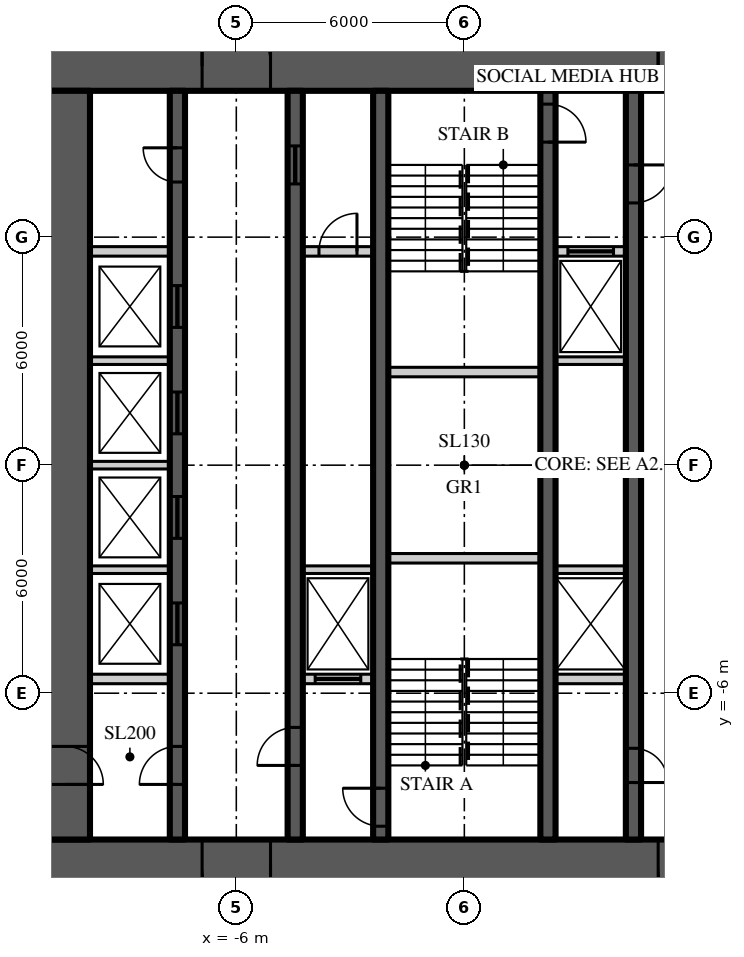
"""IFC4 building model, lengths in metres.
Left out: names, types, materials, properties, quantities, classifications, styles, units other than length and angle.
Written with IfcOpenShell. Run it as: python <this file> out.ifc"""

import sys

from ifc_helpers import new_model, si_unit, direction, frame, frame_2d, origin, place, context, subcontext, project, spatial, rectangle, extrude, element, fill, save


model = new_model("IFC4")
c1 = context("Model", 3, precision=1e-05, world=origin(), true_north=direction((0.0, 1.0)))
c2 = subcontext(c1, "Body", "Model", "MODEL_VIEW")
j1 = project(units=[si_unit("LENGTHUNIT", "METRE"), si_unit("PLANEANGLEUNIT", "RADIAN")], contexts=[c1])
p1 = place(None, origin())
s1 = spatial("IfcSite", under=j1, at=p1, CompositionType="ELEMENT")
p2 = place(p1, origin())
s2 = spatial("IfcBuilding", under=s1, at=p2, CompositionType="ELEMENT")
p3 = place(p2, frame((0.0, 0.0, 74.7)))
s3 = spatial("IfcBuildingStorey", under=s2, at=p3, CompositionType="ELEMENT", Elevation=74.7)
p4 = place(p3, frame((-11.15, 10.5, 0.0), z_axis=(0.0, 0.0, 1.0), x_axis=(1.0, 0.0, 0.0)))
e1 = element("IfcWall", 1, at=p4, inside=s3, PredefinedType="SHEAR", context=c2, shape_type="SweptSolid", body=[
    extrude(rectangle(XDim=22.3, YDim=1.3, at=frame_2d((11.15, 0.0))), origin(), (0.0, 0.0, 1.0), 3.9),
])
p5 = place(p4, frame((4.25, 0.0, 0.0)))
e2 = element("IfcOpeningElement", 2, at=p5, cuts=e1, PredefinedType="OPENING", context=c2, shape_type="SweptSolid", body=[
    extrude(rectangle(XDim=1.8, YDim=2.2, at=frame_2d((0.9, 1.1))), frame((0.0, 0.66, 0.0), z_axis=(0.0, -1.0, 0.0), x_axis=(1.0, 0.0, 0.0)), (0.0, 0.0, 1.0), 1.32),
])
p6 = place(p4, frame((16.25, 0.0, 0.0)))
e3 = element("IfcOpeningElement", 3, at=p6, cuts=e1, PredefinedType="OPENING", context=c2, shape_type="SweptSolid", body=[
    extrude(rectangle(XDim=1.8, YDim=2.2, at=frame_2d((0.9, 1.1))), frame((0.0, 0.66, 0.0), z_axis=(0.0, -1.0, 0.0), x_axis=(1.0, 0.0, 0.0)), (0.0, 0.0, 1.0), 1.32),
])
p7 = place(p3, frame((11.15, -10.5, 0.0), z_axis=(0.0, 0.0, 1.0), x_axis=(-1.0, 0.0, 0.0)))
e4 = element("IfcWall", 4, at=p7, inside=s3, PredefinedType="SHEAR", context=c2, shape_type="SweptSolid", body=[
    extrude(rectangle(XDim=22.3, YDim=1.3, at=frame_2d((11.15, 0.0))), origin(), (0.0, 0.0, 1.0), 3.9),
])
p8 = place(p7, frame((16.25, 0.0, 0.0)))
e5 = element("IfcOpeningElement", 5, at=p8, cuts=e4, PredefinedType="OPENING", context=c2, shape_type="SweptSolid", body=[
    extrude(rectangle(XDim=1.8, YDim=2.2, at=frame_2d((0.9, 1.1))), frame((0.0, 0.66, 0.0), z_axis=(0.0, -1.0, 0.0), x_axis=(1.0, 0.0, 0.0)), (0.0, 0.0, 1.0), 1.32),
])
p9 = place(p7, frame((4.25, 0.0, 0.0)))
e6 = element("IfcOpeningElement", 6, at=p9, cuts=e4, PredefinedType="OPENING", context=c2, shape_type="SweptSolid", body=[
    extrude(rectangle(XDim=1.8, YDim=2.2, at=frame_2d((0.9, 1.1))), frame((0.0, 0.66, 0.0), z_axis=(0.0, -1.0, 0.0), x_axis=(1.0, 0.0, 0.0)), (0.0, 0.0, 1.0), 1.32),
])
p10 = place(p3, frame((-10.5, 9.85, 0.0), z_axis=(0.0, 0.0, 1.0), x_axis=(0.0, -1.0, 0.0)))
e7 = element("IfcWall", 7, at=p10, inside=s3, PredefinedType="SHEAR", context=c2, shape_type="SweptSolid", body=[
    extrude(rectangle(XDim=19.7, YDim=1.3, at=frame_2d((9.85, 0.0))), origin(), (0.0, 0.0, 1.0), 3.9),
])
p11 = place(p10, frame((17.25, 0.0, 0.0)))
e8 = element("IfcOpeningElement", 8, at=p11, cuts=e7, PredefinedType="OPENING", context=c2, shape_type="SweptSolid", body=[
    extrude(rectangle(XDim=1.0, YDim=2.2, at=frame_2d((0.5, 1.1))), frame((0.0, 0.66, 0.0), z_axis=(0.0, -1.0, 0.0), x_axis=(1.0, 0.0, 0.0)), (0.0, 0.0, 1.0), 1.32),
])
p12 = place(p3, frame((-7.55, -9.85, 0.0), z_axis=(0.0, 0.0, 1.0), x_axis=(0.0, 1.0, 0.0)))
e9 = element("IfcWall", 9, at=p12, inside=s3, PredefinedType="SHEAR", context=c2, shape_type="SweptSolid", body=[
    extrude(rectangle(XDim=19.7, YDim=0.4, at=frame_2d((9.85, 0.0))), origin(), (0.0, 0.0, 1.0), 3.9),
])
p13 = place(p12, frame((1.45, 0.0, 0.0)))
e10 = element("IfcOpeningElement", 10, at=p13, cuts=e9, PredefinedType="OPENING", context=c2, shape_type="SweptSolid", body=[
    extrude(rectangle(XDim=1.0, YDim=2.2, at=frame_2d((0.5, 1.1))), frame((0.0, 0.21, 0.0), z_axis=(0.0, -1.0, 0.0), x_axis=(1.0, 0.0, 0.0)), (0.0, 0.0, 1.0), 0.42),
])
p14 = place(p12, frame((17.3, 0.0, 0.0)))
e11 = element("IfcOpeningElement", 11, at=p14, cuts=e9, PredefinedType="OPENING", context=c2, shape_type="SweptSolid", body=[
    extrude(rectangle(XDim=0.9, YDim=2.1, at=frame_2d((0.45, 1.05))), frame((0.0, 0.21, 0.0), z_axis=(0.0, -1.0, 0.0), x_axis=(1.0, 0.0, 0.0)), (0.0, 0.0, 1.0), 0.42),
])
p15 = place(p12, frame((5.125, 0.0, 0.0)))
e12 = element("IfcOpeningElement", 12, at=p15, cuts=e9, PredefinedType="OPENING", context=c2, shape_type="SweptSolid", body=[
    extrude(rectangle(XDim=1.1, YDim=2.2, at=frame_2d((0.55, 1.1))), frame((0.0, 0.21, 0.0), z_axis=(0.0, -1.0, 0.0), x_axis=(1.0, 0.0, 0.0)), (0.0, 0.0, 1.0), 0.42),
])
p16 = place(p12, frame((7.925, 0.0, 0.0)))
e13 = element("IfcOpeningElement", 13, at=p16, cuts=e9, PredefinedType="OPENING", context=c2, shape_type="SweptSolid", body=[
    extrude(rectangle(XDim=1.1, YDim=2.2, at=frame_2d((0.55, 1.1))), frame((0.0, 0.21, 0.0), z_axis=(0.0, -1.0, 0.0), x_axis=(1.0, 0.0, 0.0)), (0.0, 0.0, 1.0), 0.42),
])
p17 = place(p12, frame((10.675, 0.0, 0.0)))
e14 = element("IfcOpeningElement", 14, at=p17, cuts=e9, PredefinedType="OPENING", context=c2, shape_type="SweptSolid", body=[
    extrude(rectangle(XDim=1.1, YDim=2.2, at=frame_2d((0.55, 1.1))), frame((0.0, 0.21, 0.0), z_axis=(0.0, -1.0, 0.0), x_axis=(1.0, 0.0, 0.0)), (0.0, 0.0, 1.0), 0.42),
])
p18 = place(p12, frame((13.475, 0.0, 0.0)))
e15 = element("IfcOpeningElement", 15, at=p18, cuts=e9, PredefinedType="OPENING", context=c2, shape_type="SweptSolid", body=[
    extrude(rectangle(XDim=1.1, YDim=2.2, at=frame_2d((0.55, 1.1))), frame((0.0, 0.21, 0.0), z_axis=(0.0, -1.0, 0.0), x_axis=(1.0, 0.0, 0.0)), (0.0, 0.0, 1.0), 0.42),
])
p19 = place(p3, frame((-4.45, -9.85, 0.0), z_axis=(0.0, 0.0, 1.0), x_axis=(0.0, 1.0, 0.0)))
e16 = element("IfcWall", 16, at=p19, inside=s3, PredefinedType="SHEAR", context=c2, shape_type="SweptSolid", body=[
    extrude(rectangle(XDim=19.7, YDim=0.4, at=frame_2d((9.85, 0.0))), origin(), (0.0, 0.0, 1.0), 3.9),
])
p20 = place(p19, frame((1.95, 0.0, 0.0)))
e17 = element("IfcOpeningElement", 17, at=p20, cuts=e16, PredefinedType="OPENING", context=c2, shape_type="SweptSolid", body=[
    extrude(rectangle(XDim=1.0, YDim=2.2, at=frame_2d((0.5, 1.1))), frame((0.0, 0.21, 0.0), z_axis=(0.0, -1.0, 0.0), x_axis=(1.0, 0.0, 0.0)), (0.0, 0.0, 1.0), 0.42),
])
p21 = place(p19, frame((17.25, 0.0, 0.0)))
e18 = element("IfcOpeningElement", 18, at=p21, cuts=e16, PredefinedType="OPENING", context=c2, shape_type="SweptSolid", body=[
    extrude(rectangle(XDim=1.0, YDim=2.1, at=frame_2d((0.5, 1.05))), frame((0.0, 0.21, 0.0), z_axis=(0.0, -1.0, 0.0), x_axis=(1.0, 0.0, 0.0)), (0.0, 0.0, 1.0), 0.42),
])
p22 = place(p3, frame((4.45, 9.85, 0.0), z_axis=(0.0, 0.0, 1.0), x_axis=(0.0, -1.0, 0.0)))
e19 = element("IfcWall", 19, at=p22, inside=s3, PredefinedType="SHEAR", context=c2, shape_type="SweptSolid", body=[
    extrude(rectangle(XDim=19.7, YDim=0.4, at=frame_2d((9.85, 0.0))), origin(), (0.0, 0.0, 1.0), 3.9),
])
p23 = place(p22, frame((1.95, 0.0, 0.0)))
e20 = element("IfcOpeningElement", 20, at=p23, cuts=e19, PredefinedType="OPENING", context=c2, shape_type="SweptSolid", body=[
    extrude(rectangle(XDim=1.0, YDim=2.2, at=frame_2d((0.5, 1.1))), frame((0.0, 0.21, 0.0), z_axis=(0.0, -1.0, 0.0), x_axis=(1.0, 0.0, 0.0)), (0.0, 0.0, 1.0), 0.42),
])
p24 = place(p22, frame((17.3, 0.0, 0.0)))
e21 = element("IfcOpeningElement", 21, at=p24, cuts=e19, PredefinedType="OPENING", context=c2, shape_type="SweptSolid", body=[
    extrude(rectangle(XDim=0.9, YDim=2.1, at=frame_2d((0.45, 1.05))), frame((0.0, 0.21, 0.0), z_axis=(0.0, -1.0, 0.0), x_axis=(1.0, 0.0, 0.0)), (0.0, 0.0, 1.0), 0.42),
])
p25 = place(p3, frame((-2.2, -9.85, 0.0), z_axis=(0.0, 0.0, 1.0), x_axis=(0.0, 1.0, 0.0)))
e22 = element("IfcWall", 22, at=p25, inside=s3, PredefinedType="SHEAR", context=c2, shape_type="SweptSolid", body=[
    extrude(rectangle(XDim=19.7, YDim=0.4, at=frame_2d((9.85, 0.0))), origin(), (0.0, 0.0, 1.0), 3.9),
])
p26 = place(p25, frame((0.35, 0.0, 0.0)))
e23 = element("IfcOpeningElement", 23, at=p26, cuts=e22, PredefinedType="OPENING", context=c2, shape_type="SweptSolid", body=[
    extrude(rectangle(XDim=1.0, YDim=2.2, at=frame_2d((0.5, 1.1))), frame((0.0, 0.21, 0.0), z_axis=(0.0, -1.0, 0.0), x_axis=(1.0, 0.0, 0.0)), (0.0, 0.0, 1.0), 0.42),
])
p27 = place(p3, frame((2.2, 9.85, 0.0), z_axis=(0.0, 0.0, 1.0), x_axis=(0.0, -1.0, 0.0)))
e24 = element("IfcWall", 24, at=p27, inside=s3, PredefinedType="SHEAR", context=c2, shape_type="SweptSolid", body=[
    extrude(rectangle(XDim=19.7, YDim=0.4, at=frame_2d((9.85, 0.0))), origin(), (0.0, 0.0, 1.0), 3.9),
])
p28 = place(p27, frame((0.35, 0.0, 0.0)))
e25 = element("IfcOpeningElement", 25, at=p28, cuts=e24, PredefinedType="OPENING", context=c2, shape_type="SweptSolid", body=[
    extrude(rectangle(XDim=1.0, YDim=2.2, at=frame_2d((0.5, 1.1))), frame((0.0, 0.21, 0.0), z_axis=(0.0, -1.0, 0.0), x_axis=(1.0, 0.0, 0.0)), (0.0, 0.0, 1.0), 0.42),
])
p29 = place(p3, frame((-9.85, 5.625, 0.0), z_axis=(0.0, 0.0, 1.0), x_axis=(1.0, 0.0, 0.0)))
e26 = element("IfcWall", 26, at=p29, inside=s3, PredefinedType="SOLIDWALL", context=c2, shape_type="SweptSolid", body=[
    extrude(rectangle(XDim=2.1, YDim=0.25, at=frame_2d((1.05, 0.0))), origin(), (0.0, 0.0, 1.0), 3.7),
])
p30 = place(p3, frame((-4.25, 5.625, 0.0), z_axis=(0.0, 0.0, 1.0), x_axis=(1.0, 0.0, 0.0)))
e27 = element("IfcWall", 27, at=p30, inside=s3, PredefinedType="SOLIDWALL", context=c2, shape_type="SweptSolid", body=[
    extrude(rectangle(XDim=1.85, YDim=0.25, at=frame_2d((0.925, 0.0))), origin(), (0.0, 0.0, 1.0), 3.7),
])
p31 = place(p30, frame((0.425, 0.0, 0.0)))
e28 = element("IfcOpeningElement", 28, at=p31, cuts=e27, PredefinedType="OPENING", context=c2, shape_type="SweptSolid", body=[
    extrude(rectangle(XDim=1.0, YDim=2.2, at=frame_2d((0.5, 1.1))), frame((0.0, 0.135, 0.0), z_axis=(0.0, -1.0, 0.0), x_axis=(1.0, 0.0, 0.0)), (0.0, 0.0, 1.0), 0.27),
])
p32 = place(p3, frame((2.4, 5.625, 0.0), z_axis=(0.0, 0.0, 1.0), x_axis=(1.0, 0.0, 0.0)))
e29 = element("IfcWall", 29, at=p32, inside=s3, PredefinedType="SOLIDWALL", context=c2, shape_type="SweptSolid", body=[
    extrude(rectangle(XDim=1.85, YDim=0.25, at=frame_2d((0.925, 0.0))), origin(), (0.0, 0.0, 1.0), 3.7),
])
p33 = place(p32, frame((0.325, 0.0, 0.0)))
e30 = element("IfcOpeningElement", 30, at=p33, cuts=e29, PredefinedType="OPENING", context=c2, shape_type="SweptSolid", body=[
    extrude(rectangle(XDim=1.2, YDim=2.2, at=frame_2d((0.6, 1.1))), frame((0.0, 0.135, 0.0), z_axis=(0.0, -1.0, 0.0), x_axis=(1.0, 0.0, 0.0)), (0.0, 0.0, 1.0), 0.27),
])
p34 = place(p3, frame((-9.85, -5.625, 0.0), z_axis=(0.0, 0.0, 1.0), x_axis=(1.0, 0.0, 0.0)))
e31 = element("IfcWall", 31, at=p34, inside=s3, PredefinedType="SOLIDWALL", context=c2, shape_type="SweptSolid", body=[
    extrude(rectangle(XDim=2.1, YDim=0.25, at=frame_2d((1.05, 0.0))), origin(), (0.0, 0.0, 1.0), 3.7),
])
p35 = place(p3, frame((-4.25, -5.625, 0.0), z_axis=(0.0, 0.0, 1.0), x_axis=(1.0, 0.0, 0.0)))
e32 = element("IfcWall", 32, at=p35, inside=s3, PredefinedType="SOLIDWALL", context=c2, shape_type="SweptSolid", body=[
    extrude(rectangle(XDim=1.85, YDim=0.25, at=frame_2d((0.925, 0.0))), origin(), (0.0, 0.0, 1.0), 3.7),
])
p36 = place(p35, frame((0.325, 0.0, 0.0)))
e33 = element("IfcOpeningElement", 33, at=p36, cuts=e32, PredefinedType="OPENING", context=c2, shape_type="SweptSolid", body=[
    extrude(rectangle(XDim=1.2, YDim=2.2, at=frame_2d((0.6, 1.1))), frame((0.0, 0.135, 0.0), z_axis=(0.0, -1.0, 0.0), x_axis=(1.0, 0.0, 0.0)), (0.0, 0.0, 1.0), 0.27),
])
p37 = place(p3, frame((2.4, -5.625, 0.0), z_axis=(0.0, 0.0, 1.0), x_axis=(1.0, 0.0, 0.0)))
e34 = element("IfcWall", 34, at=p37, inside=s3, PredefinedType="SOLIDWALL", context=c2, shape_type="SweptSolid", body=[
    extrude(rectangle(XDim=1.85, YDim=0.25, at=frame_2d((0.925, 0.0))), origin(), (0.0, 0.0, 1.0), 3.7),
])
for number, where, z_axis, x_axis in (
    (35, (-2.0, -2.45, 0.0), (0.0, 0.0, 1.0), (1.0, 0.0, 0.0)),
    (36, (-2.0, 2.45, 0.0), (0.0, 0.0, 1.0), (1.0, 0.0, 0.0)),
):
    element("IfcWall", number, at=place(p3, frame(where, z_axis=z_axis, x_axis=x_axis)), inside=s3, PredefinedType="SOLIDWALL", context=c2, shape_type="SweptSolid", body=[
        extrude(rectangle(XDim=4.0, YDim=0.25, at=frame_2d((2.0, 0.0))), origin(), (0.0, 0.0, 1.0), 3.7),
    ])
p38 = place(p3, frame((-9.85, -2.75, 0.0), z_axis=(0.0, 0.0, 1.0), x_axis=(1.0, 0.0, 0.0)))
e37 = element("IfcWall", 37, at=p38, inside=s3, PredefinedType="SOLIDWALL", context=c2, shape_type="SweptSolid", body=[
    extrude(rectangle(XDim=2.1, YDim=0.2, at=frame_2d((1.05, 0.0))), origin(), (0.0, 0.0, 1.0), 3.7),
])
for number, where, z_axis, x_axis in (
    (38, (-4.25, -2.75, 0.0), (0.0, 0.0, 1.0), (1.0, 0.0, 0.0)),
    (39, (2.4, -2.75, 0.0), (0.0, 0.0, 1.0), (1.0, 0.0, 0.0)),
):
    element("IfcWall", number, at=place(p3, frame(where, z_axis=z_axis, x_axis=x_axis)), inside=s3, PredefinedType="SOLIDWALL", context=c2, shape_type="SweptSolid", body=[
        extrude(rectangle(XDim=1.85, YDim=0.2, at=frame_2d((0.925, 0.0))), origin(), (0.0, 0.0, 1.0), 3.7),
    ])
for number, where, z_axis, x_axis in (
    (40, (-9.85, 0.0, 0.0), (0.0, 0.0, 1.0), (1.0, 0.0, 0.0)),
    (41, (-9.85, 2.75, 0.0), (0.0, 0.0, 1.0), (1.0, 0.0, 0.0)),
):
    element("IfcWall", number, at=place(p3, frame(where, z_axis=z_axis, x_axis=x_axis)), inside=s3, PredefinedType="SOLIDWALL", context=c2, shape_type="SweptSolid", body=[
        extrude(rectangle(XDim=2.1, YDim=0.2, at=frame_2d((1.05, 0.0))), origin(), (0.0, 0.0, 1.0), 3.7),
    ])
p39 = place(p3, frame((2.4, 2.75, 0.0), z_axis=(0.0, 0.0, 1.0), x_axis=(1.0, 0.0, 0.0)))
e42 = element("IfcWall", 42, at=p39, inside=s3, PredefinedType="SOLIDWALL", context=c2, shape_type="SweptSolid", body=[
    extrude(rectangle(XDim=1.85, YDim=0.2, at=frame_2d((0.925, 0.0))), origin(), (0.0, 0.0, 1.0), 3.7),
])
p40 = place(p5, origin())
e43 = element("IfcDoor", 43, at=p40, inside=s3, OperationType="DOUBLE_DOOR_DOUBLE_SWING", PredefinedType="DOOR", context=c2, shape_type="SweptSolid", body=[
    extrude(rectangle(XDim=1.8, YDim=2.2, at=frame_2d((0.9, 1.1))), frame((0.0, 0.025, 0.0), z_axis=(0.0, -1.0, 0.0), x_axis=(1.0, 0.0, 0.0)), (0.0, 0.0, 1.0), 0.05),
])
fill(e2, e43)
p41 = place(p8, origin())
e44 = element("IfcDoor", 44, at=p41, inside=s3, OperationType="DOUBLE_DOOR_DOUBLE_SWING", PredefinedType="DOOR", context=c2, shape_type="SweptSolid", body=[
    extrude(rectangle(XDim=1.8, YDim=2.2, at=frame_2d((0.9, 1.1))), frame((0.0, 0.025, 0.0), z_axis=(0.0, -1.0, 0.0), x_axis=(1.0, 0.0, 0.0)), (0.0, 0.0, 1.0), 0.05),
])
fill(e5, e44)
p42 = place(p6, origin())
e45 = element("IfcDoor", 45, at=p42, inside=s3, OperationType="DOUBLE_DOOR_DOUBLE_SWING", PredefinedType="DOOR", context=c2, shape_type="SweptSolid", body=[
    extrude(rectangle(XDim=1.8, YDim=2.2, at=frame_2d((0.9, 1.1))), frame((0.0, 0.025, 0.0), z_axis=(0.0, -1.0, 0.0), x_axis=(1.0, 0.0, 0.0)), (0.0, 0.0, 1.0), 0.05),
])
fill(e3, e45)
p43 = place(p9, origin())
e46 = element("IfcDoor", 46, at=p43, inside=s3, OperationType="DOUBLE_DOOR_DOUBLE_SWING", PredefinedType="DOOR", context=c2, shape_type="SweptSolid", body=[
    extrude(rectangle(XDim=1.8, YDim=2.2, at=frame_2d((0.9, 1.1))), frame((0.0, 0.025, 0.0), z_axis=(0.0, -1.0, 0.0), x_axis=(1.0, 0.0, 0.0)), (0.0, 0.0, 1.0), 0.05),
])
fill(e6, e46)
p44 = place(p13, origin())
e47 = element("IfcDoor", 47, at=p44, inside=s3, OperationType="SINGLE_SWING_LEFT", PredefinedType="DOOR", context=c2, shape_type="SweptSolid", body=[
    extrude(rectangle(XDim=1.0, YDim=2.2, at=frame_2d((0.5, 1.1))), frame((0.0, 0.025, 0.0), z_axis=(0.0, -1.0, 0.0), x_axis=(1.0, 0.0, 0.0)), (0.0, 0.0, 1.0), 0.05),
])
fill(e10, e47)
p45 = place(p11, origin())
e48 = element("IfcDoor", 48, at=p45, inside=s3, OperationType="SINGLE_SWING_RIGHT", PredefinedType="DOOR", context=c2, shape_type="SweptSolid", body=[
    extrude(rectangle(XDim=1.0, YDim=2.2, at=frame_2d((0.5, 1.1))), frame((0.0, 0.025, 0.0), z_axis=(0.0, -1.0, 0.0), x_axis=(1.0, 0.0, 0.0)), (0.0, 0.0, 1.0), 0.05),
])
fill(e8, e48)
p46 = place(p20, origin())
e49 = element("IfcDoor", 49, at=p46, inside=s3, OperationType="SINGLE_SWING_LEFT", PredefinedType="DOOR", context=c2, shape_type="SweptSolid", body=[
    extrude(rectangle(XDim=1.0, YDim=2.2, at=frame_2d((0.5, 1.1))), frame((0.0, 0.025, 0.0), z_axis=(0.0, -1.0, 0.0), x_axis=(1.0, 0.0, 0.0)), (0.0, 0.0, 1.0), 0.05),
])
fill(e17, e49)
p47 = place(p26, origin())
e50 = element("IfcDoor", 50, at=p47, inside=s3, OperationType="SINGLE_SWING_RIGHT", PredefinedType="DOOR", context=c2, shape_type="SweptSolid", body=[
    extrude(rectangle(XDim=1.0, YDim=2.2, at=frame_2d((0.5, 1.1))), frame((0.0, 0.025, 0.0), z_axis=(0.0, -1.0, 0.0), x_axis=(1.0, 0.0, 0.0)), (0.0, 0.0, 1.0), 0.05),
])
fill(e23, e50)
p48 = place(p23, origin())
e51 = element("IfcDoor", 51, at=p48, inside=s3, OperationType="SINGLE_SWING_LEFT", PredefinedType="DOOR", context=c2, shape_type="SweptSolid", body=[
    extrude(rectangle(XDim=1.0, YDim=2.2, at=frame_2d((0.5, 1.1))), frame((0.0, 0.025, 0.0), z_axis=(0.0, -1.0, 0.0), x_axis=(1.0, 0.0, 0.0)), (0.0, 0.0, 1.0), 0.05),
])
fill(e20, e51)
p49 = place(p28, origin())
e52 = element("IfcDoor", 52, at=p49, inside=s3, OperationType="SINGLE_SWING_RIGHT", PredefinedType="DOOR", context=c2, shape_type="SweptSolid", body=[
    extrude(rectangle(XDim=1.0, YDim=2.2, at=frame_2d((0.5, 1.1))), frame((0.0, 0.025, 0.0), z_axis=(0.0, -1.0, 0.0), x_axis=(1.0, 0.0, 0.0)), (0.0, 0.0, 1.0), 0.05),
])
fill(e25, e52)
p50 = place(p14, origin())
e53 = element("IfcDoor", 53, at=p50, inside=s3, OperationType="SINGLE_SWING_RIGHT", PredefinedType="DOOR", context=c2, shape_type="SweptSolid", body=[
    extrude(rectangle(XDim=0.9, YDim=2.1, at=frame_2d((0.45, 1.05))), frame((0.0, 0.025, 0.0), z_axis=(0.0, -1.0, 0.0), x_axis=(1.0, 0.0, 0.0)), (0.0, 0.0, 1.0), 0.05),
])
fill(e11, e53)
p51 = place(p21, origin())
e54 = element("IfcDoor", 54, at=p51, inside=s3, OperationType="SLIDING_TO_LEFT", PredefinedType="DOOR", context=c2, shape_type="SweptSolid", body=[
    extrude(rectangle(XDim=1.0, YDim=2.1, at=frame_2d((0.5, 1.05))), frame((0.0, 0.025, 0.0), z_axis=(0.0, -1.0, 0.0), x_axis=(1.0, 0.0, 0.0)), (0.0, 0.0, 1.0), 0.05),
])
fill(e18, e54)
p52 = place(p24, origin())
e55 = element("IfcDoor", 55, at=p52, inside=s3, OperationType="SINGLE_SWING_RIGHT", PredefinedType="DOOR", context=c2, shape_type="SweptSolid", body=[
    extrude(rectangle(XDim=0.9, YDim=2.1, at=frame_2d((0.45, 1.05))), frame((0.0, 0.025, 0.0), z_axis=(0.0, -1.0, 0.0), x_axis=(1.0, 0.0, 0.0)), (0.0, 0.0, 1.0), 0.05),
])
fill(e21, e55)
p53 = place(p15, origin())
e56 = element("IfcDoor", 56, at=p53, inside=s3, OperationType="SLIDING_TO_LEFT", PredefinedType="DOOR", context=c2, shape_type="SweptSolid", body=[
    extrude(rectangle(XDim=1.1, YDim=2.2, at=frame_2d((0.55, 1.1))), frame((0.0, 0.025, 0.0), z_axis=(0.0, -1.0, 0.0), x_axis=(1.0, 0.0, 0.0)), (0.0, 0.0, 1.0), 0.05),
])
fill(e12, e56)
p54 = place(p16, origin())
e57 = element("IfcDoor", 57, at=p54, inside=s3, OperationType="SLIDING_TO_LEFT", PredefinedType="DOOR", context=c2, shape_type="SweptSolid", body=[
    extrude(rectangle(XDim=1.1, YDim=2.2, at=frame_2d((0.55, 1.1))), frame((0.0, 0.025, 0.0), z_axis=(0.0, -1.0, 0.0), x_axis=(1.0, 0.0, 0.0)), (0.0, 0.0, 1.0), 0.05),
])
fill(e13, e57)
p55 = place(p17, origin())
e58 = element("IfcDoor", 58, at=p55, inside=s3, OperationType="SLIDING_TO_LEFT", PredefinedType="DOOR", context=c2, shape_type="SweptSolid", body=[
    extrude(rectangle(XDim=1.1, YDim=2.2, at=frame_2d((0.55, 1.1))), frame((0.0, 0.025, 0.0), z_axis=(0.0, -1.0, 0.0), x_axis=(1.0, 0.0, 0.0)), (0.0, 0.0, 1.0), 0.05),
])
fill(e14, e58)
p56 = place(p18, origin())
e59 = element("IfcDoor", 59, at=p56, inside=s3, OperationType="SLIDING_TO_LEFT", PredefinedType="DOOR", context=c2, shape_type="SweptSolid", body=[
    extrude(rectangle(XDim=1.1, YDim=2.2, at=frame_2d((0.55, 1.1))), frame((0.0, 0.025, 0.0), z_axis=(0.0, -1.0, 0.0), x_axis=(1.0, 0.0, 0.0)), (0.0, 0.0, 1.0), 0.05),
])
fill(e15, e59)
p57 = place(p36, origin())
e60 = element("IfcDoor", 60, at=p57, inside=s3, OperationType="SLIDING_TO_LEFT", PredefinedType="DOOR", context=c2, shape_type="SweptSolid", body=[
    extrude(rectangle(XDim=1.2, YDim=2.2, at=frame_2d((0.6, 1.1))), frame((0.0, 0.025, 0.0), z_axis=(0.0, -1.0, 0.0), x_axis=(1.0, 0.0, 0.0)), (0.0, 0.0, 1.0), 0.05),
])
fill(e33, e60)
p58 = place(p33, origin())
e61 = element("IfcDoor", 61, at=p58, inside=s3, OperationType="SLIDING_TO_LEFT", PredefinedType="DOOR", context=c2, shape_type="SweptSolid", body=[
    extrude(rectangle(XDim=1.2, YDim=2.2, at=frame_2d((0.6, 1.1))), frame((0.0, 0.025, 0.0), z_axis=(0.0, -1.0, 0.0), x_axis=(1.0, 0.0, 0.0)), (0.0, 0.0, 1.0), 0.05),
])
fill(e30, e61)
p59 = place(p31, origin())
e62 = element("IfcDoor", 62, at=p59, inside=s3, OperationType="SINGLE_SWING_RIGHT", PredefinedType="DOOR", context=c2, shape_type="SweptSolid", body=[
    extrude(rectangle(XDim=1.0, YDim=2.2, at=frame_2d((0.5, 1.1))), frame((0.0, 0.025, 0.0), z_axis=(0.0, -1.0, 0.0), x_axis=(1.0, 0.0, 0.0)), (0.0, 0.0, 1.0), 0.05),
])
fill(e28, e62)
save(model, sys.argv[1])
